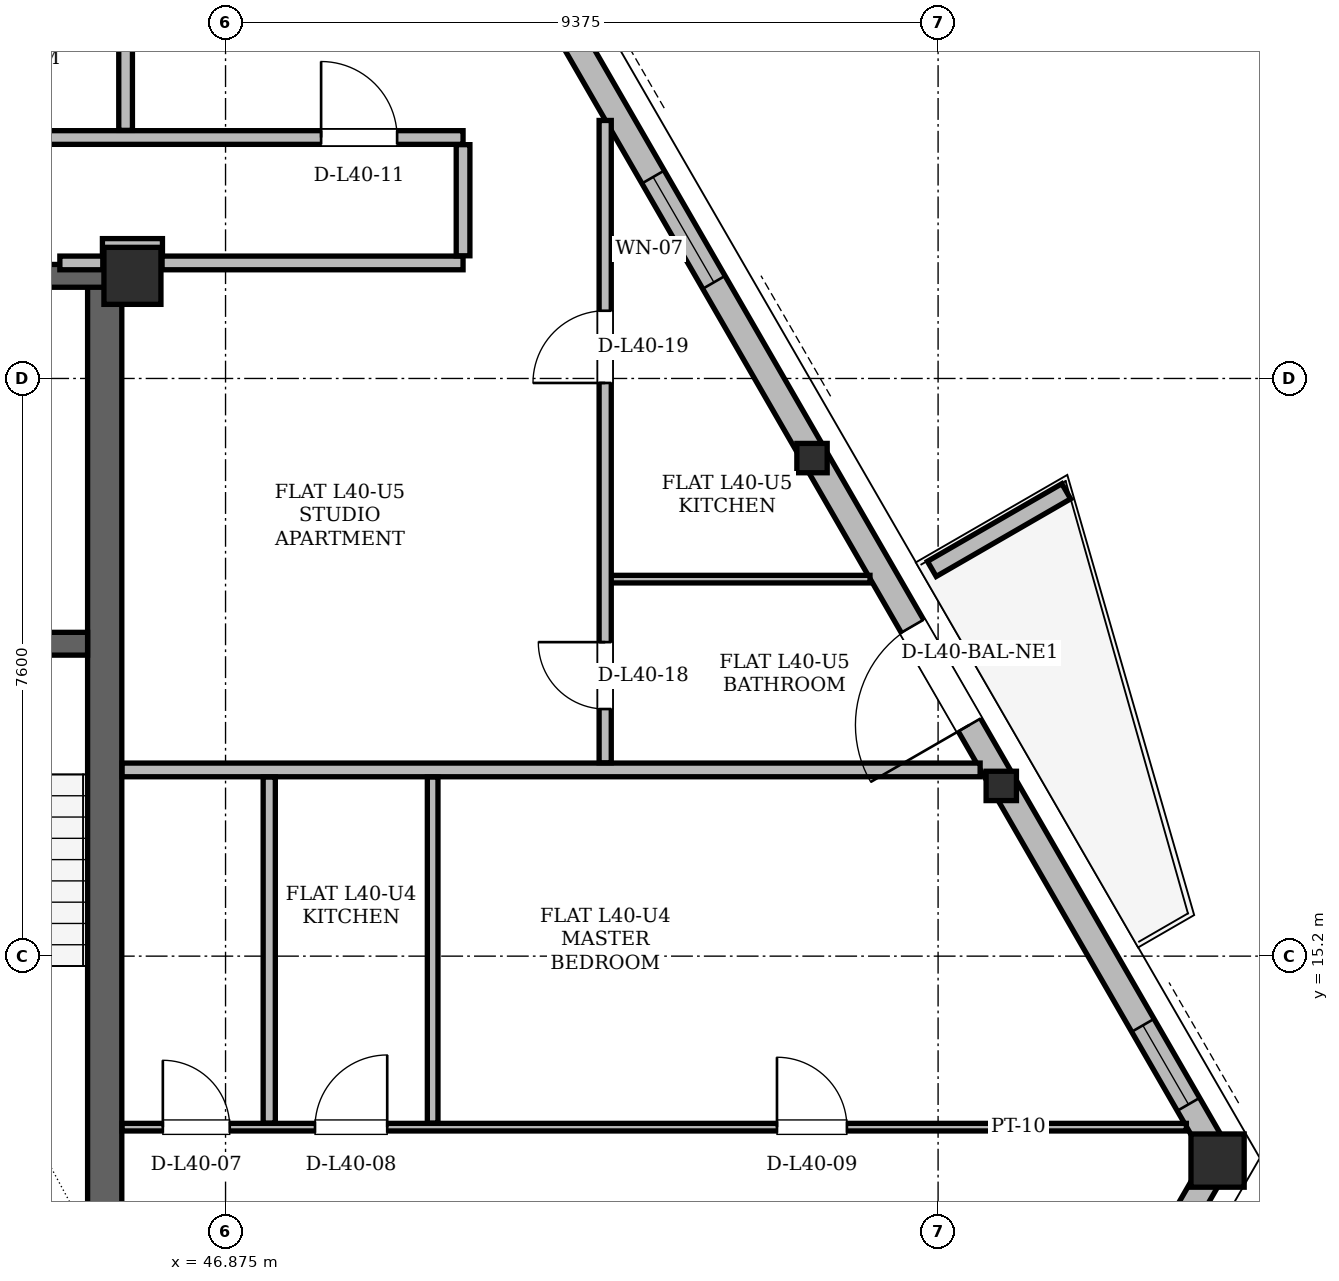
"""IFC4 building model, lengths in metres.
Left out: names, types, materials, properties, quantities, classifications, styles, units other than length and angle.
Written with IfcOpenShell. Run it as: python <this file> out.ifc"""

import sys

from ifc_helpers import new_model, si_unit, direction, frame, frame_2d, origin, origin_2d, place, context, subcontext, project, spatial, polyline, rectangle, hollow_rectangle, i_section, outline, extrude, element, fill, save


model = new_model("IFC4")
c1 = context("Model", 3, precision=1e-05, world=origin(), true_north=direction((0.0, 1.0)))
c2 = subcontext(c1, "Body", "Model", "MODEL_VIEW")
j1 = project(units=[si_unit("LENGTHUNIT", "METRE"), si_unit("PLANEANGLEUNIT", "RADIAN")], contexts=[c1])
p1 = place(None, origin())
s1 = spatial("IfcSite", under=j1, at=p1, CompositionType="ELEMENT")
p2 = place(p1, origin())
s2 = spatial("IfcBuilding", under=s1, at=p2, CompositionType="ELEMENT")
p3 = place(p2, frame((0.0, 0.0, 153.0)))
s3 = spatial("IfcBuildingStorey", under=s2, at=p3, CompositionType="ELEMENT", Elevation=153.0)
p4 = place(p3, frame((45.65, 24.15, 0.0), z_axis=(0.0, 0.0, 1.0), x_axis=(1.0, 0.0, 0.0)))
e1 = element("IfcColumn", 1, at=p4, inside=s3, PredefinedType="COLUMN", context=c2, shape_type="SweptSolid", body=[
    extrude(hollow_rectangle(XDim=0.75, YDim=0.75, WallThickness=0.06, at=origin_2d()), origin(), (0.0, 0.0, 1.0), 3.6),
])
p5 = place(p3, frame((59.952, 12.544, 0.004), z_axis=(-0.013797331752, -0.018758933811, 0.999728831253), x_axis=(0.805569064221, -0.592501884191, 0.0)))
e2 = element("IfcColumn", 2, at=p5, inside=s3, PredefinedType="COLUMN", context=c2, shape_type="SweptSolid", body=[
    extrude(hollow_rectangle(XDim=0.7, YDim=0.7, WallThickness=0.055, at=origin_2d()), origin(), (0.0, 0.0, 1.0), 3.592),
])
p6 = place(p3, frame((57.109, 17.469, 0.004), z_axis=(-0.015360919156, -0.016176543182, 0.999751149843), x_axis=(0.725151558483, -0.68858929503, 0.0)))
e3 = element("IfcColumn", 3, at=p6, inside=s3, PredefinedType="COLUMN", context=c2, shape_type="SweptSolid", body=[
    extrude(i_section(OverallWidth=0.399, OverallDepth=0.386, WebThickness=0.021, FlangeThickness=0.033, at=origin_2d()), origin(), (0.0, 0.0, 1.0), 3.592),
])
p7 = place(p3, frame((54.621, 21.777, 0.004), z_axis=(-0.016652541963, -0.013933759602, 0.999764243804), x_axis=(0.641722632674, -0.766936804903, 0.0)))
e4 = element("IfcColumn", 4, at=p7, inside=s3, PredefinedType="COLUMN", context=c2, shape_type="SweptSolid", body=[
    extrude(i_section(OverallWidth=0.399, OverallDepth=0.386, WebThickness=0.021, FlangeThickness=0.033, at=origin_2d()), origin(), (0.0, 0.0, 1.0), 3.592),
])
p8 = place(p3, frame((45.285, 11.0, 0.0), z_axis=(0.0, 0.0, 1.0), x_axis=(0.0, 1.0, 0.0)))
e5 = element("IfcWall", 5, at=p8, inside=s3, PredefinedType="SHEAR", context=c2, shape_type="SweptSolid", body=[
    extrude(rectangle(XDim=13.3, YDim=0.45, at=frame_2d((6.65, 0.0))), origin(), (0.0, 0.0, 1.0), 3.38),
])
p9 = place(p3, frame((29.65, 24.15, 0.0), z_axis=(0.0, 0.0, 1.0), x_axis=(1.0, 0.0, 0.0)))
e6 = element("IfcWall", 6, at=p9, inside=s3, PredefinedType="SHEAR", context=c2, shape_type="SweptSolid", body=[
    extrude(rectangle(XDim=15.7, YDim=0.3, at=frame_2d((7.85, 0.0))), origin(), (0.0, 0.0, 1.0), 3.38),
])
p10 = place(p9, frame((1.7, 0.0, 0.0)))
e7 = element("IfcOpeningElement", 7, at=p10, cuts=e6, PredefinedType="OPENING", context=c2, shape_type="SweptSolid", body=[
    extrude(rectangle(XDim=1.2, YDim=2.2, at=frame_2d((0.6, 1.1))), frame((0.0, 0.15, 0.0), z_axis=(0.0, -1.0, 0.0), x_axis=(1.0, 0.0, 0.0)), (0.0, 0.0, 1.0), 0.3),
])
p11 = place(p9, frame((12.8, 0.0, 0.0)))
e8 = element("IfcOpeningElement", 8, at=p11, cuts=e6, PredefinedType="OPENING", context=c2, shape_type="SweptSolid", body=[
    extrude(rectangle(XDim=1.2, YDim=2.2, at=frame_2d((0.6, 1.1))), frame((0.0, 0.15, 0.0), z_axis=(0.0, -1.0, 0.0), x_axis=(1.0, 0.0, 0.0)), (0.0, 0.0, 1.0), 0.3),
])
p12 = place(p9, frame((6.55, 0.0, 0.0)))
e9 = element("IfcOpeningElement", 9, at=p12, cuts=e6, PredefinedType="OPENING", context=c2, shape_type="SweptSolid", body=[
    extrude(rectangle(XDim=0.9, YDim=2.05, at=frame_2d((0.45, 1.025))), frame((0.0, 0.15, 0.0), z_axis=(0.0, -1.0, 0.0), x_axis=(1.0, 0.0, 0.0)), (0.0, 0.0, 1.0), 0.3),
])
p13 = place(p9, frame((8.45, 0.0, 0.0)))
e10 = element("IfcOpeningElement", 10, at=p13, cuts=e6, PredefinedType="OPENING", context=c2, shape_type="SweptSolid", body=[
    extrude(rectangle(XDim=0.9, YDim=2.05, at=frame_2d((0.45, 1.025))), frame((0.0, 0.15, 0.0), z_axis=(0.0, -1.0, 0.0), x_axis=(1.0, 0.0, 0.0)), (0.0, 0.0, 1.0), 0.3),
])
p14 = place(p3, frame((41.05, 19.31, 0.0), z_axis=(0.0, 0.0, 1.0), x_axis=(1.0, 0.0, 0.0)))
e11 = element("IfcWall", 11, at=p14, inside=s3, PredefinedType="SHEAR", context=c2, shape_type="SweptSolid", body=[
    extrude(rectangle(XDim=4.01, YDim=0.3, at=frame_2d((2.005, 0.0))), origin(), (0.0, 0.0, 1.0), 3.38),
])
p15 = place(p14, frame((1.6, 0.0, 0.0)))
e12 = element("IfcOpeningElement", 12, at=p15, cuts=e11, PredefinedType="OPENING", context=c2, shape_type="SweptSolid", body=[
    extrude(rectangle(XDim=1.4, YDim=2.2, at=frame_2d((0.7, 1.1))), frame((0.0, 0.15, 0.0), z_axis=(0.0, -1.0, 0.0), x_axis=(1.0, 0.0, 0.0)), (0.0, 0.0, 1.0), 0.3),
])
p16 = place(p3, frame((55.27, 4.434, 0.0), z_axis=(0.0, 0.0, 1.0), x_axis=(0.499991763293, 0.866030159197, 0.0)))
e13 = element("IfcWall", 13, at=p16, inside=s3, PredefinedType="SOLIDWALL", context=c2, shape_type="SweptSolid", body=[
    extrude(rectangle(XDim=9.365, YDim=0.34, at=frame_2d((4.682, 0.0))), origin(), (0.0, 0.0, 1.0), 2.6),
])
p17 = place(p3, frame((59.952, 12.544, 0.0), z_axis=(0.0, 0.0, 1.0), x_axis=(-0.500000946011, 0.866024857604, 0.0)))
e14 = element("IfcWall", 14, at=p17, inside=s3, PredefinedType="SOLIDWALL", context=c2, shape_type="SweptSolid", body=[
    extrude(rectangle(XDim=35.54, YDim=0.34, at=frame_2d((17.77, 0.0))), origin(), (0.0, 0.0, 1.0), 2.6),
])
p18 = place(p17, frame((6.579, 0.0, 0.0)))
e15 = element("IfcOpeningElement", 15, at=p18, cuts=e14, PredefinedType="OPENING", context=c2, shape_type="SweptSolid", body=[
    extrude(rectangle(XDim=1.5, YDim=2.2, at=frame_2d((0.75, 1.1))), frame((0.0, 0.17, 0.0), z_axis=(0.0, -1.0, 0.0), x_axis=(1.0, 0.0, 0.0)), (0.0, 0.0, 1.0), 0.34),
])
p19 = place(p17, frame((26.105, 0.0, 0.0)))
e16 = element("IfcOpeningElement", 16, at=p19, cuts=e14, PredefinedType="OPENING", context=c2, shape_type="SweptSolid", body=[
    extrude(rectangle(XDim=1.3, YDim=2.2, at=frame_2d((0.65, 1.1))), frame((0.0, 0.17, 0.0), z_axis=(0.0, -1.0, 0.0), x_axis=(1.0, 0.0, 0.0)), (0.0, 0.0, 1.0), 0.34),
])
p20 = place(p17, frame((0.816, 0.0, 0.85)))
e17 = element("IfcOpeningElement", 17, at=p20, cuts=e14, PredefinedType="OPENING", context=c2, shape_type="SweptSolid", body=[
    extrude(rectangle(XDim=1.2, YDim=1.48, at=frame_2d((0.6, 0.74))), frame((0.0, 0.17, 0.0), z_axis=(0.0, -1.0, 0.0), x_axis=(1.0, 0.0, 0.0)), (0.0, 0.0, 1.0), 0.34),
])
p21 = place(p17, frame((17.181, 0.0, 0.85)))
e18 = element("IfcOpeningElement", 18, at=p21, cuts=e14, PredefinedType="OPENING", context=c2, shape_type="SweptSolid", body=[
    extrude(rectangle(XDim=2.6, YDim=1.64, at=frame_2d((1.3, 0.82))), frame((0.0, 0.17, 0.0), z_axis=(0.0, -1.0, 0.0), x_axis=(1.0, 0.0, 0.0)), (0.0, 0.0, 1.0), 0.34),
])
p22 = place(p17, frame((22.978, 0.0, 0.85)))
e19 = element("IfcOpeningElement", 19, at=p22, cuts=e14, PredefinedType="OPENING", context=c2, shape_type="SweptSolid", body=[
    extrude(rectangle(XDim=1.2, YDim=1.48, at=frame_2d((0.6, 0.74))), frame((0.0, 0.17, 0.0), z_axis=(0.0, -1.0, 0.0), x_axis=(1.0, 0.0, 0.0)), (0.0, 0.0, 1.0), 0.34),
])
p23 = place(p17, frame((13.303, 0.0, 0.85)))
e20 = element("IfcOpeningElement", 20, at=p23, cuts=e14, PredefinedType="OPENING", context=c2, shape_type="SweptSolid", body=[
    extrude(rectangle(XDim=1.6, YDim=1.64, at=frame_2d((0.8, 0.82))), frame((0.0, 0.17, 0.0), z_axis=(0.0, -1.0, 0.0), x_axis=(1.0, 0.0, 0.0)), (0.0, 0.0, 1.0), 0.34),
])
p24 = place(p17, frame((31.32, 0.0, 0.85)))
e21 = element("IfcOpeningElement", 21, at=p24, cuts=e14, PredefinedType="OPENING", context=c2, shape_type="SweptSolid", body=[
    extrude(rectangle(XDim=3.0, YDim=1.64, at=frame_2d((1.5, 0.82))), frame((0.0, 0.17, 0.0), z_axis=(0.0, -1.0, 0.0), x_axis=(1.0, 0.0, 0.0)), (0.0, 0.0, 1.0), 0.34),
])
p25 = place(p3, frame((56.168, 20.294, 0.0), z_axis=(0.0, 0.0, 1.0), x_axis=(0.866012356593, 0.500022597718, 0.0)))
e22 = element("IfcWall", 22, at=p25, inside=s3, PredefinedType="PARAPET", context=c2, shape_type="SweptSolid", body=[
    extrude(outline(polyline([(0.0, 0.0), (2.042, 0.0), (2.042, 1.1), (0.0, 1.32), (0.0, 0.0)])), frame((0.0, 0.115, 0.0), z_axis=(0.0, -1.0, 0.0), x_axis=(1.0, 0.0, 0.0)), (0.0, 0.0, 1.0), 0.23),
])
p26 = place(p3, frame((45.514, 12.95, 0.0), z_axis=(0.0, 0.0, 1.0), x_axis=(1.0, 0.0, 0.0)))
e23 = element("IfcWall", 23, at=p26, inside=s3, PredefinedType="PARTITIONING", context=c2, shape_type="SweptSolid", body=[
    extrude(rectangle(XDim=14.003, YDim=0.1, at=frame_2d((7.001, 0.0))), origin(), (0.0, 0.0, 1.0), 2.42),
])
p27 = place(p26, frame((0.536, 0.0, 0.0)))
e24 = element("IfcOpeningElement", 24, at=p27, cuts=e23, PredefinedType="OPENING", context=c2, shape_type="SweptSolid", body=[
    extrude(rectangle(XDim=0.88, YDim=2.08, at=frame_2d((0.44, 1.04))), frame((0.0, 0.05, 0.0), z_axis=(0.0, -1.0, 0.0), x_axis=(1.0, 0.0, 0.0)), (0.0, 0.0, 1.0), 0.1),
])
p28 = place(p26, frame((2.538, 0.0, 0.0)))
e25 = element("IfcOpeningElement", 25, at=p28, cuts=e23, PredefinedType="OPENING", context=c2, shape_type="SweptSolid", body=[
    extrude(rectangle(XDim=0.95, YDim=2.1, at=frame_2d((0.475, 1.05))), frame((0.0, 0.05, 0.0), z_axis=(0.0, -1.0, 0.0), x_axis=(1.0, 0.0, 0.0)), (0.0, 0.0, 1.0), 0.1),
])
p29 = place(p26, frame((8.616, 0.0, 0.0)))
e26 = element("IfcOpeningElement", 26, at=p29, cuts=e23, PredefinedType="OPENING", context=c2, shape_type="SweptSolid", body=[
    extrude(rectangle(XDim=0.92, YDim=2.12, at=frame_2d((0.46, 1.06))), frame((0.0, 0.05, 0.0), z_axis=(0.0, -1.0, 0.0), x_axis=(1.0, 0.0, 0.0)), (0.0, 0.0, 1.0), 0.1),
])
p30 = place(p3, frame((45.514, 17.65, 0.0), z_axis=(0.0, 0.0, 1.0), x_axis=(1.0, 0.0, 0.0)))
e27 = element("IfcWall", 27, at=p30, inside=s3, PredefinedType="PARTITIONING", context=c2, shape_type="SweptSolid", body=[
    extrude(rectangle(XDim=11.289, YDim=0.18, at=frame_2d((5.645, 0.0))), origin(), (0.0, 0.0, 1.0), 2.42),
])
p31 = place(p3, frame((51.872, 20.16, 0.0), z_axis=(0.0, 0.0, 1.0), x_axis=(1.0, 0.0, 0.0)))
e28 = element("IfcWall", 28, at=p31, inside=s3, PredefinedType="PARTITIONING", context=c2, shape_type="SweptSolid", body=[
    extrude(rectangle(XDim=3.482, YDim=0.1, at=frame_2d((1.741, 0.0))), origin(), (0.0, 0.0, 1.0), 3.38),
])
p32 = place(p3, frame((44.695, 24.32, 0.0), z_axis=(0.0, 0.0, 1.0), x_axis=(1.0, 0.0, 0.0)))
e29 = element("IfcWall", 29, at=p32, inside=s3, PredefinedType="PARTITIONING", context=c2, shape_type="SweptSolid", body=[
    extrude(rectangle(XDim=0.565, YDim=0.18, at=frame_2d((0.282, 0.0))), origin(), (0.0, 0.0, 1.0), 2.42),
])
p33 = place(p3, frame((46.04, 24.32, 0.0), z_axis=(0.0, 0.0, 1.0), x_axis=(1.0, 0.0, 0.0)))
e30 = element("IfcWall", 30, at=p33, inside=s3, PredefinedType="PARTITIONING", context=c2, shape_type="SweptSolid", body=[
    extrude(rectangle(XDim=3.96, YDim=0.18, at=frame_2d((1.98, 0.0))), origin(), (0.0, 0.0, 1.0), 3.38),
])
p34 = place(p3, frame((45.255, 24.55, 0.0), z_axis=(0.0, 0.0, 1.0), x_axis=(1.0, 0.0, 0.0)))
e31 = element("IfcWall", 31, at=p34, inside=s3, PredefinedType="PARTITIONING", context=c2, shape_type="SweptSolid", body=[
    extrude(rectangle(XDim=0.79, YDim=0.18, at=frame_2d((0.395, 0.0))), origin(), (0.0, 0.0, 1.0), 2.842),
])
p35 = place(p3, frame((38.3, 25.97, 0.0), z_axis=(0.0, 0.0, 1.0), x_axis=(1.0, 0.0, 0.0)))
e32 = element("IfcWall", 32, at=p35, inside=s3, PredefinedType="PARTITIONING", context=c2, shape_type="SweptSolid", body=[
    extrude(rectangle(XDim=11.7, YDim=0.18, at=frame_2d((5.85, 0.0))), origin(), (0.0, 0.0, 1.0), 2.842),
])
p36 = place(p35, frame((9.832, 0.0, 0.0)))
e33 = element("IfcOpeningElement", 33, at=p36, cuts=e32, PredefinedType="OPENING", context=c2, shape_type="SweptSolid", body=[
    extrude(rectangle(XDim=1.0, YDim=2.18, at=frame_2d((0.5, 1.09))), frame((0.0, 0.09, 0.0), z_axis=(0.0, -1.0, 0.0), x_axis=(1.0, 0.0, 0.0)), (0.0, 0.0, 1.0), 0.18),
])
p37 = place(p3, frame((45.56, 26.064, 0.0), z_axis=(0.0, 0.0, 1.0), x_axis=(0.0, 1.0, 0.0)))
e34 = element("IfcWall", 34, at=p37, inside=s3, PredefinedType="PARTITIONING", context=c2, shape_type="SweptSolid", body=[
    extrude(rectangle(XDim=11.06, YDim=0.18, at=frame_2d((5.53, 0.0))), origin(), (0.0, 0.0, 1.0), 3.38),
])
p38 = place(p3, frame((47.45, 13.004, 0.0), z_axis=(0.0, 0.0, 1.0), x_axis=(0.0, 1.0, 0.0)))
e35 = element("IfcWall", 35, at=p38, inside=s3, PredefinedType="PARTITIONING", context=c2, shape_type="SweptSolid", body=[
    extrude(rectangle(XDim=4.552, YDim=0.16, at=frame_2d((2.276, 0.0))), origin(), (0.0, 0.0, 1.0), 3.38),
])
p39 = place(p3, frame((49.6, 13.004, 0.0), z_axis=(0.0, 0.0, 1.0), x_axis=(0.0, 1.0, 0.0)))
e36 = element("IfcWall", 36, at=p39, inside=s3, PredefinedType="PARTITIONING", context=c2, shape_type="SweptSolid", body=[
    extrude(rectangle(XDim=4.552, YDim=0.14, at=frame_2d((2.276, 0.0))), origin(), (0.0, 0.0, 1.0), 3.38),
])
p40 = place(p3, frame((50.0, 24.414, 0.0), z_axis=(0.0, 0.0, 1.0), x_axis=(0.0, 1.0, 0.0)))
e37 = element("IfcWall", 37, at=p40, inside=s3, PredefinedType="PARTITIONING", context=c2, shape_type="SweptSolid", body=[
    extrude(rectangle(XDim=1.462, YDim=0.18, at=frame_2d((0.731, 0.0))), origin(), (0.0, 0.0, 1.0), 3.38),
])
p41 = place(p3, frame((51.87, 17.744, 0.0), z_axis=(0.0, 0.0, 1.0), x_axis=(0.0, 1.0, 0.0)))
e38 = element("IfcWall", 38, at=p41, inside=s3, PredefinedType="PARTITIONING", context=c2, shape_type="SweptSolid", body=[
    extrude(rectangle(XDim=8.45, YDim=0.16, at=frame_2d((4.225, 0.0))), origin(), (0.0, 0.0, 1.0), 3.38),
])
p42 = place(p41, frame((0.707, 0.0, 0.0)))
e39 = element("IfcOpeningElement", 39, at=p42, cuts=e38, PredefinedType="OPENING", context=c2, shape_type="SweptSolid", body=[
    extrude(rectangle(XDim=0.88, YDim=2.08, at=frame_2d((0.44, 1.04))), frame((0.0, 0.08, 0.0), z_axis=(0.0, -1.0, 0.0), x_axis=(1.0, 0.0, 0.0)), (0.0, 0.0, 1.0), 0.16),
])
p43 = place(p41, frame((4.997, 0.0, 0.0)))
e40 = element("IfcOpeningElement", 40, at=p43, cuts=e38, PredefinedType="OPENING", context=c2, shape_type="SweptSolid", body=[
    extrude(rectangle(XDim=0.95, YDim=2.1, at=frame_2d((0.475, 1.05))), frame((0.0, 0.08, 0.0), z_axis=(0.0, -1.0, 0.0), x_axis=(1.0, 0.0, 0.0)), (0.0, 0.0, 1.0), 0.16),
])
p44 = place(p18, origin())
e41 = element("IfcDoor", 41, at=p44, inside=s3, OperationType="SINGLE_SWING_LEFT", PredefinedType="DOOR", context=c2, shape_type="SweptSolid", body=[
    extrude(rectangle(XDim=1.5, YDim=2.2, at=frame_2d((0.75, 1.1))), frame((0.0, 0.025, 0.0), z_axis=(0.0, -1.0, 0.0), x_axis=(1.0, 0.0, 0.0)), (0.0, 0.0, 1.0), 0.05),
])
fill(e15, e41)
p45 = place(p20, origin())
e42 = element("IfcWindow", 42, at=p45, inside=s3, PartitioningType="SINGLE_PANEL", PredefinedType="WINDOW", context=c2, shape_type="SweptSolid", body=[
    extrude(rectangle(XDim=1.2, YDim=1.48, at=frame_2d((0.6, 0.74))), frame((0.0, 0.03, 0.0), z_axis=(0.0, -1.0, 0.0), x_axis=(1.0, 0.0, 0.0)), (0.0, 0.0, 1.0), 0.06),
])
fill(e17, e42)
p46 = place(p23, origin())
e43 = element("IfcWindow", 43, at=p46, inside=s3, PartitioningType="SINGLE_PANEL", PredefinedType="WINDOW", context=c2, shape_type="SweptSolid", body=[
    extrude(rectangle(XDim=1.6, YDim=1.64, at=frame_2d((0.8, 0.82))), frame((0.0, 0.03, 0.0), z_axis=(0.0, -1.0, 0.0), x_axis=(1.0, 0.0, 0.0)), (0.0, 0.0, 1.0), 0.06),
])
fill(e20, e43)
p47 = place(p27, origin())
e44 = element("IfcDoor", 44, at=p47, inside=s3, OperationType="SINGLE_SWING_LEFT", PredefinedType="DOOR", context=c2, shape_type="SweptSolid", body=[
    extrude(rectangle(XDim=0.88, YDim=2.08, at=frame_2d((0.44, 1.04))), frame((0.0, 0.025, 0.0), z_axis=(0.0, -1.0, 0.0), x_axis=(1.0, 0.0, 0.0)), (0.0, 0.0, 1.0), 0.05),
])
fill(e24, e44)
p48 = place(p28, origin())
e45 = element("IfcDoor", 45, at=p48, inside=s3, OperationType="SINGLE_SWING_RIGHT", PredefinedType="DOOR", context=c2, shape_type="SweptSolid", body=[
    extrude(rectangle(XDim=0.95, YDim=2.1, at=frame_2d((0.475, 1.05))), frame((0.0, 0.025, 0.0), z_axis=(0.0, -1.0, 0.0), x_axis=(1.0, 0.0, 0.0)), (0.0, 0.0, 1.0), 0.05),
])
fill(e25, e45)
p49 = place(p29, origin())
e46 = element("IfcDoor", 46, at=p49, inside=s3, OperationType="SINGLE_SWING_LEFT", PredefinedType="DOOR", context=c2, shape_type="SweptSolid", body=[
    extrude(rectangle(XDim=0.92, YDim=2.12, at=frame_2d((0.46, 1.06))), frame((0.0, 0.025, 0.0), z_axis=(0.0, -1.0, 0.0), x_axis=(1.0, 0.0, 0.0)), (0.0, 0.0, 1.0), 0.05),
])
fill(e26, e46)
p50 = place(p36, origin())
e47 = element("IfcDoor", 47, at=p50, inside=s3, OperationType="SINGLE_SWING_LEFT", PredefinedType="DOOR", context=c2, shape_type="SweptSolid", body=[
    extrude(rectangle(XDim=1.0, YDim=2.18, at=frame_2d((0.5, 1.09))), frame((0.0, 0.025, 0.0), z_axis=(0.0, -1.0, 0.0), x_axis=(1.0, 0.0, 0.0)), (0.0, 0.0, 1.0), 0.05),
])
fill(e33, e47)
p51 = place(p42, origin())
e48 = element("IfcDoor", 48, at=p51, inside=s3, OperationType="SINGLE_SWING_RIGHT", PredefinedType="DOOR", context=c2, shape_type="SweptSolid", body=[
    extrude(rectangle(XDim=0.88, YDim=2.08, at=frame_2d((0.44, 1.04))), frame((0.0, 0.025, 0.0), z_axis=(0.0, -1.0, 0.0), x_axis=(1.0, 0.0, 0.0)), (0.0, 0.0, 1.0), 0.05),
])
fill(e39, e48)
p52 = place(p43, origin())
e49 = element("IfcDoor", 49, at=p52, inside=s3, OperationType="SINGLE_SWING_LEFT", PredefinedType="DOOR", context=c2, shape_type="SweptSolid", body=[
    extrude(rectangle(XDim=0.95, YDim=2.1, at=frame_2d((0.475, 1.05))), frame((0.0, 0.025, 0.0), z_axis=(0.0, -1.0, 0.0), x_axis=(1.0, 0.0, 0.0)), (0.0, 0.0, 1.0), 0.05),
])
fill(e40, e49)
save(model, sys.argv[1])
